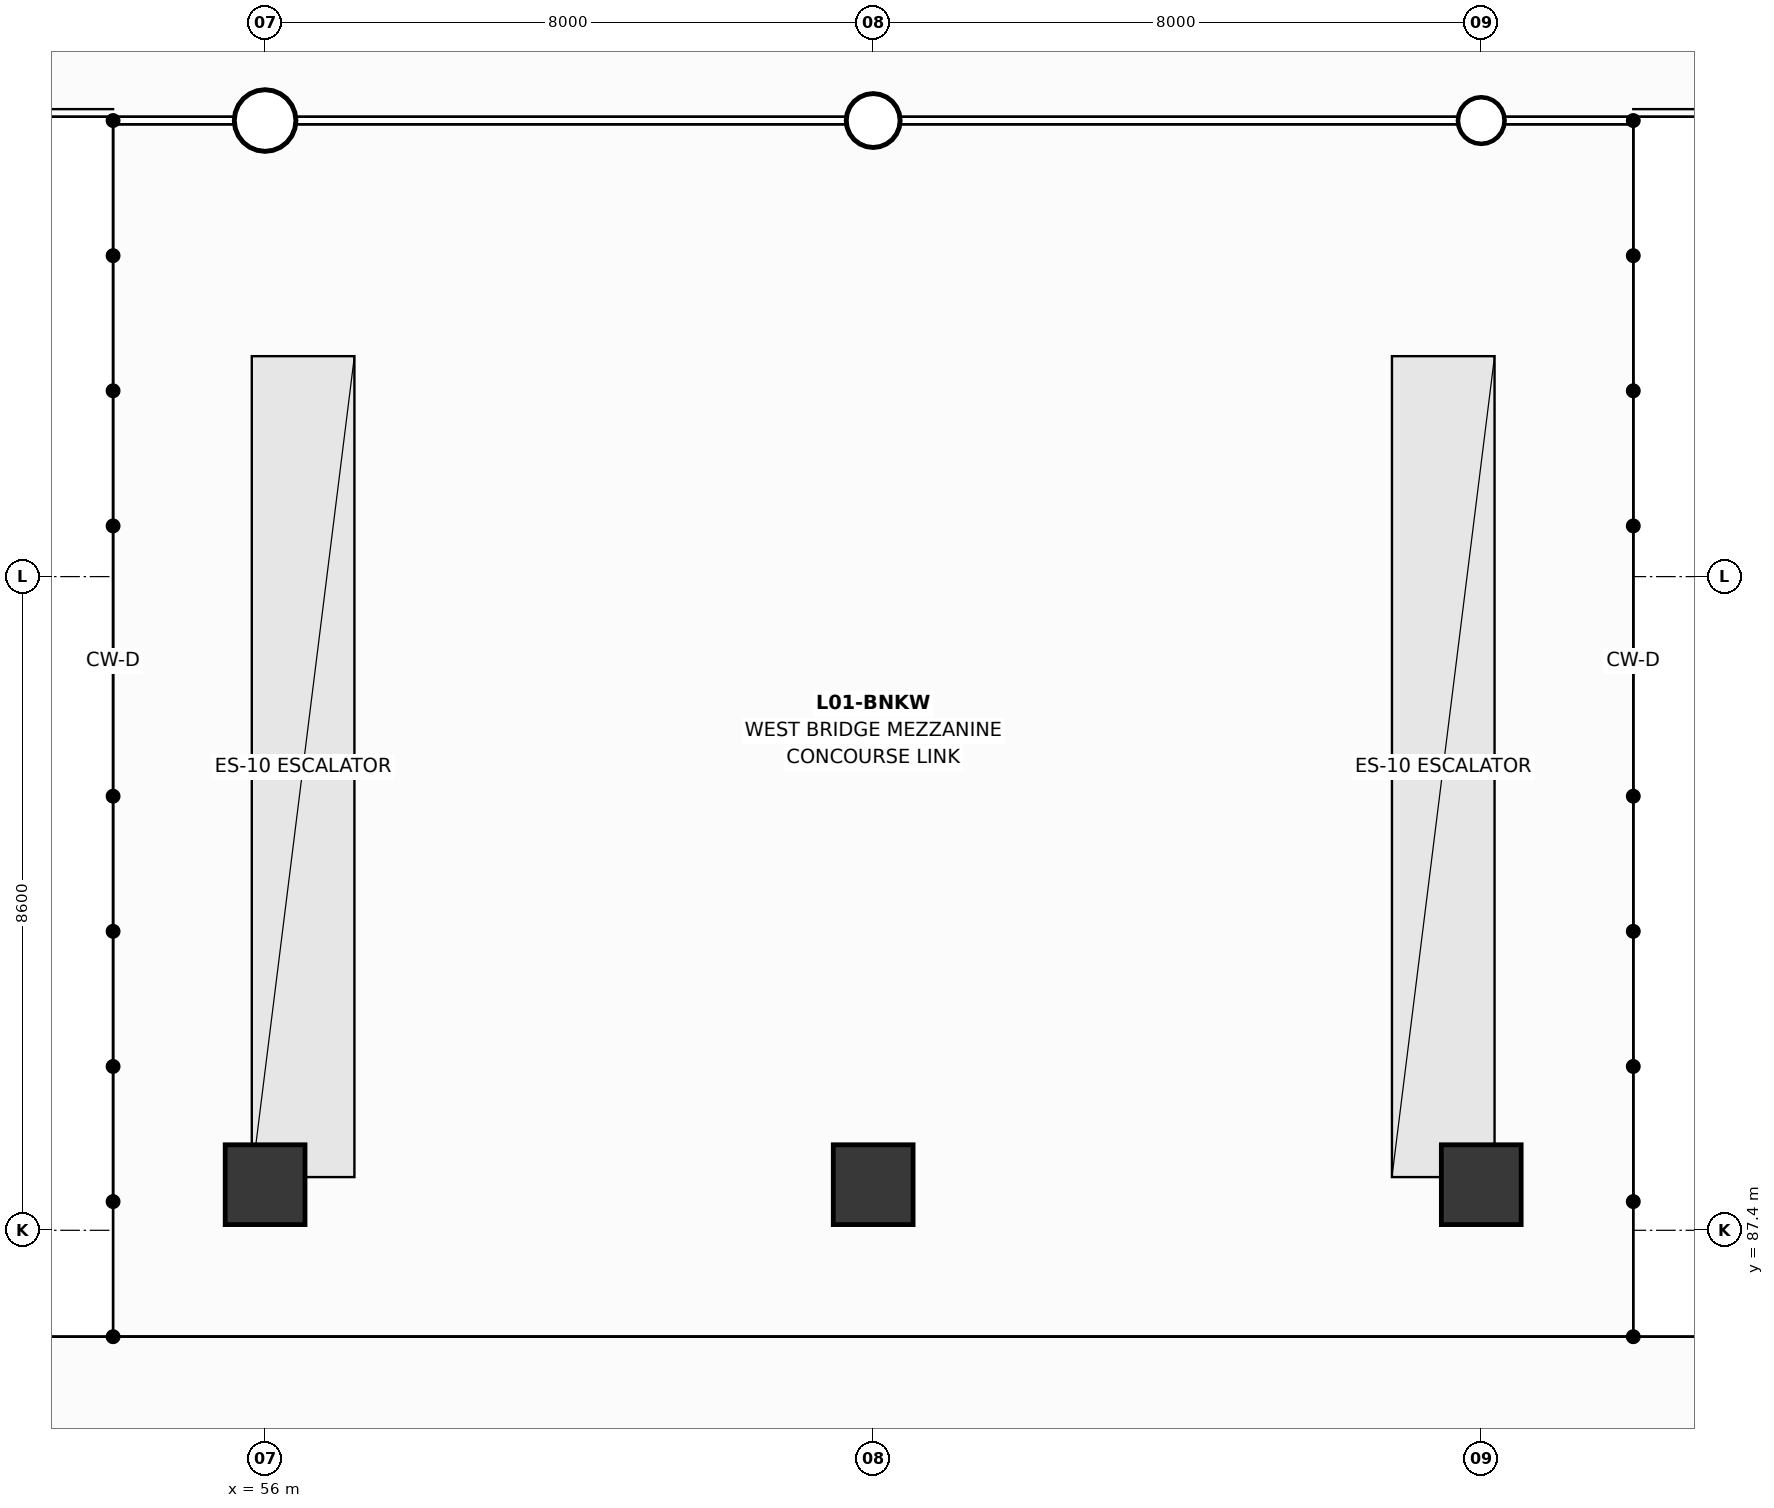
"""IFC4 building model, lengths in metres.
Left out: names, types, materials, properties, quantities, classifications, styles, units other than length and angle.
Written with IfcOpenShell. Run it as: python <this file> out.ifc"""

import sys

from ifc_helpers import new_model, si_unit, direction, frame, origin, origin_2d, place, context, subcontext, project, spatial, rectangle, hollow_circle, extrude, element, save


model = new_model("IFC4")
c1 = context("Model", 3, precision=1e-05, world=origin(), true_north=direction((0.0, 1.0)))
c2 = subcontext(c1, "Body", "Model", "MODEL_VIEW")
j1 = project(units=[si_unit("LENGTHUNIT", "METRE"), si_unit("PLANEANGLEUNIT", "RADIAN")], contexts=[c1])
p1 = place(None, origin())
s1 = spatial("IfcSite", under=j1, at=p1, CompositionType="ELEMENT")
p2 = place(p1, origin())
s2 = spatial("IfcBuilding", under=s1, at=p2, CompositionType="ELEMENT")
p3 = place(p2, frame((0.0, 0.0, 6.0)))
s3 = spatial("IfcBuildingStorey", under=s2, at=p3, CompositionType="ELEMENT", Elevation=6.0)
p4 = place(p3, frame((56.0, 102.0, 0.0), z_axis=(0.0, 0.0, 1.0), x_axis=(1.0, 0.0, 0.0)))
e1 = element("IfcColumn", 1, at=p4, inside=s3, PredefinedType="COLUMN", context=c2, shape_type="SweptSolid", body=[
    extrude(hollow_circle(Radius=0.406, WallThickness=0.025, at=origin_2d()), origin(), (0.0, 0.0, 1.0), 5.4),
])
p5 = place(p3, frame((64.0, 102.0, 0.0), z_axis=(0.0, 0.0, 1.0), x_axis=(1.0, 0.0, 0.0)))
e2 = element("IfcColumn", 2, at=p5, inside=s3, PredefinedType="COLUMN", context=c2, shape_type="SweptSolid", body=[
    extrude(hollow_circle(Radius=0.355, WallThickness=0.025, at=origin_2d()), origin(), (0.0, 0.0, 1.0), 5.4),
])
p6 = place(p3, frame((72.0, 102.0, 0.0), z_axis=(0.0, 0.0, 1.0), x_axis=(1.0, 0.0, 0.0)))
e3 = element("IfcColumn", 3, at=p6, inside=s3, PredefinedType="COLUMN", context=c2, shape_type="SweptSolid", body=[
    extrude(hollow_circle(Radius=0.305, WallThickness=0.02, at=origin_2d()), origin(), (0.0, 0.0, 1.0), 5.4),
])
for number, where, z_axis, x_axis in (
    (4, (56.0, 88.0, 0.0), (0.0, 0.0, 1.0), (1.0, 0.0, 0.0)),
    (5, (64.0, 88.0, 0.0), (0.0, 0.0, 1.0), (1.0, 0.0, 0.0)),
    (6, (72.0, 88.0, 0.0), (0.0, 0.0, 1.0), (1.0, 0.0, 0.0)),
):
    element("IfcColumn", number, at=place(p3, frame(where, z_axis=z_axis, x_axis=x_axis)), inside=s3, PredefinedType="COLUMN", context=c2, shape_type="SweptSolid", body=[
        extrude(rectangle(XDim=1.05, YDim=1.05, at=origin_2d()), origin(), (0.0, 0.0, 1.0), 5.4),
    ])
save(model, sys.argv[1])
